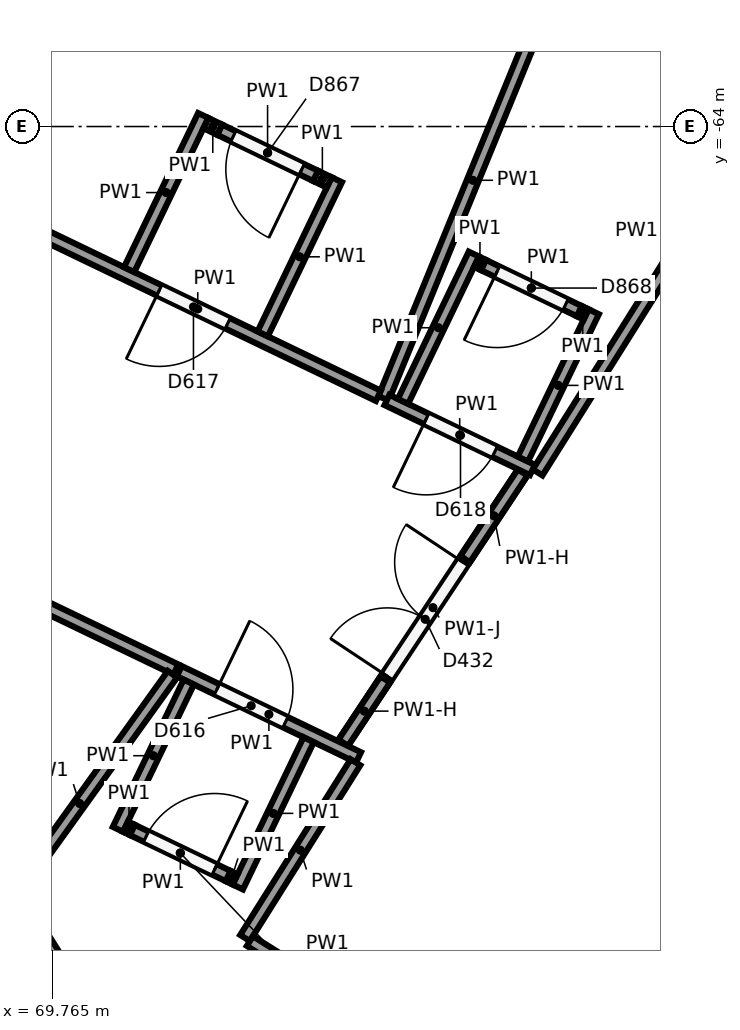
"""IFC4 building model, lengths in metres.
Left out: names, types, materials, properties, quantities, classifications, styles, units other than length and angle.
Written with IfcOpenShell. Run it as: python <this file> out.ifc"""

import sys

from ifc_helpers import new_model, si_unit, direction, frame, frame_2d, origin, origin_2d, place, context, subcontext, project, spatial, rectangle, circle, extrude, element, fill, save


model = new_model("IFC4")
c1 = context("Model", 3, precision=1e-05, world=origin(), true_north=direction((0.0, 1.0)))
c2 = subcontext(c1, "Body", "Model", "MODEL_VIEW")
j1 = project(units=[si_unit("LENGTHUNIT", "METRE"), si_unit("PLANEANGLEUNIT", "RADIAN")], contexts=[c1])
p1 = place(None, origin())
s1 = spatial("IfcSite", under=j1, at=p1, CompositionType="ELEMENT")
p2 = place(p1, origin())
s2 = spatial("IfcBuilding", under=s1, at=p2, CompositionType="ELEMENT")
p3 = place(p2, origin())
s3 = spatial("IfcBuildingStorey", under=s2, at=p3, CompositionType="ELEMENT", Elevation=0.0)
p4 = place(p3, frame((78.198, -72.272, 0.0), z_axis=(0.0, 0.0, 1.0), x_axis=(1.0, 0.0, 0.0)))
e1 = element("IfcColumn", 1, at=p4, inside=s3, PredefinedType="COLUMN", context=c2, shape_type="SweptSolid", body=[
    extrude(circle(Radius=0.6, at=origin_2d()), origin(), (0.0, 0.0, 1.0), 6.5),
])
p5 = place(p3, frame((66.937, -69.001, 0.0), z_axis=(0.0, 0.0, 1.0), x_axis=(0.901185296762, -0.433434032928, 0.0)))
e2 = element("IfcWall", 2, at=p5, inside=s3, PredefinedType="PARTITIONING", context=c2, shape_type="SweptSolid", body=[
    extrude(rectangle(XDim=4.944, YDim=0.15, at=frame_2d((2.472, 0.0))), origin(), (0.0, 0.0, 1.0), 6.15),
])
p6 = place(p3, frame((71.348, -71.206, 0.0), z_axis=(0.0, 0.0, 1.0), x_axis=(-0.583304436704, -0.812253614409, 0.0)))
e3 = element("IfcWall", 3, at=p6, inside=s3, PredefinedType="PARTITIONING", context=c2, shape_type="SweptSolid", body=[
    extrude(rectangle(XDim=4.188, YDim=0.15, at=frame_2d((2.094, 0.0))), origin(), (0.0, 0.0, 1.0), 6.15),
])
p7 = place(p3, frame((72.021, -78.442, 0.0), z_axis=(0.0, 0.0, 1.0), x_axis=(-0.532042078101, 0.846717914733, 0.0)))
e4 = element("IfcWall", 4, at=p7, inside=s3, PredefinedType="PARTITIONING", context=c2, shape_type="SweptSolid", body=[
    extrude(rectangle(XDim=4.905, YDim=0.15, at=frame_2d((2.453, 0.0))), origin(), (0.0, 0.0, 1.0), 6.15),
])
p8 = place(p3, frame((71.437, -71.165, 0.0), z_axis=(0.0, 0.0, 1.0), x_axis=(0.901204092293, -0.433394951556, 0.0)))
e5 = element("IfcWall", 5, at=p8, inside=s3, PredefinedType="PARTITIONING", context=c2, shape_type="SweptSolid", body=[
    extrude(rectangle(XDim=2.618, YDim=0.15, at=frame_2d((1.309, 0.0))), origin(), (0.0, 0.0, 1.0), 6.15),
])
p9 = place(p8, frame((0.55, 0.0, 0.0)))
e6 = element("IfcOpeningElement", 6, at=p9, cuts=e5, PredefinedType="OPENING", context=c2, shape_type="SweptSolid", body=[
    extrude(rectangle(XDim=1.0, YDim=2.1, at=frame_2d((0.5, 1.05))), frame((0.0, 0.085, 0.0), z_axis=(0.0, -1.0, 0.0), x_axis=(1.0, 0.0, 0.0)), (0.0, 0.0, 1.0), 0.17),
])
p10 = place(p3, frame((73.756, -72.364, 0.0), z_axis=(0.0, 0.0, 1.0), x_axis=(-0.532054374811, -0.846710187871, 0.0)))
e7 = element("IfcWall", 7, at=p10, inside=s3, PredefinedType="PARTITIONING", context=c2, shape_type="SweptSolid", body=[
    extrude(rectangle(XDim=2.731, YDim=0.15, at=frame_2d((1.366, 0.0))), origin(), (0.0, 0.0, 1.0), 6.15),
])
p11 = place(p3, frame((72.366, -74.716, 0.0), z_axis=(0.0, 0.0, 1.0), x_axis=(0.846749951858, -0.531991089237, 0.0)))
e8 = element("IfcWall", 8, at=p11, inside=s3, PredefinedType="PARTITIONING", context=c2, shape_type="SweptSolid", body=[
    extrude(rectangle(XDim=2.411, YDim=0.15, at=frame_2d((1.205, 0.0))), origin(), (0.0, 0.0, 1.0), 6.15),
])
p12 = place(p3, frame((76.476, -61.839, 0.0), z_axis=(0.0, 0.0, 1.0), x_axis=(-0.3791112098, -0.92535111747, 0.0)))
e9 = element("IfcWall", 9, at=p12, inside=s3, PredefinedType="PARTITIONING", context=c2, shape_type="SweptSolid", body=[
    extrude(rectangle(XDim=6.2, YDim=0.15, at=frame_2d((3.1, 0.0))), origin(), (0.0, 0.0, 1.0), 6.15),
])
p13 = place(p3, frame((74.058, -67.543, 0.0), z_axis=(0.0, 0.0, 1.0), x_axis=(-0.90118985402, 0.433424557462, 0.0)))
e10 = element("IfcWall", 10, at=p13, inside=s3, PredefinedType="PARTITIONING", context=c2, shape_type="SweptSolid", body=[
    extrude(rectangle(XDim=5.275, YDim=0.15, at=frame_2d((2.638, 0.0))), origin(), (0.0, 0.0, 1.0), 6.15),
])
p14 = place(p13, frame((2.2, 0.0, 0.0)))
e11 = element("IfcOpeningElement", 11, at=p14, cuts=e10, PredefinedType="OPENING", context=c2, shape_type="SweptSolid", body=[
    extrude(rectangle(XDim=1.0, YDim=2.1, at=frame_2d((0.5, 1.05))), frame((0.0, 0.085, 0.0), z_axis=(0.0, -1.0, 0.0), x_axis=(1.0, 0.0, 0.0)), (0.0, 0.0, 1.0), 0.17),
])
p15 = place(p3, frame((79.605, -63.055, 0.0), z_axis=(0.0, 0.0, 1.0), x_axis=(-0.532032873767, -0.846723698281, 0.0)))
e12 = element("IfcWall", 12, at=p15, inside=s3, PredefinedType="PARTITIONING", context=c2, shape_type="SweptSolid", body=[
    extrude(rectangle(XDim=6.49, YDim=0.15, at=frame_2d((3.245, 0.0))), origin(), (0.0, 0.0, 1.0), 6.15),
])
p16 = place(p3, frame((76.084, -68.518, 0.0), z_axis=(0.0, 0.0, 1.0), x_axis=(-0.901196299468, 0.433411155631, 0.0)))
e13 = element("IfcWall", 13, at=p16, inside=s3, PredefinedType="PARTITIONING", context=c2, shape_type="SweptSolid", body=[
    extrude(rectangle(XDim=2.124, YDim=0.15, at=frame_2d((1.062, 0.0))), origin(), (0.0, 0.0, 1.0), 6.15),
])
p17 = place(p16, frame((0.55, 0.0, 0.0)))
e14 = element("IfcOpeningElement", 14, at=p17, cuts=e13, PredefinedType="OPENING", context=c2, shape_type="SweptSolid", body=[
    extrude(rectangle(XDim=1.0, YDim=2.1, at=frame_2d((0.5, 1.05))), frame((0.0, 0.085, 0.0), z_axis=(0.0, -1.0, 0.0), x_axis=(1.0, 0.0, 0.0)), (0.0, 0.0, 1.0), 0.17),
])
for number, where, z_axis, x_axis in (
    (15, (71.562, -71.309, 0.0), (0.0, 0.0, 1.0), (-0.433, -0.901, 0.0)),
    (16, (73.14, -72.067, 0.0), (0.0, 0.0, 1.0), (-0.433, -0.901, 0.0)),
):
    element("IfcWall", number, at=place(p3, frame(where, z_axis=z_axis, x_axis=x_axis)), inside=s3, PredefinedType="PARTITIONING", context=c2, shape_type="SweptSolid", body=[
        extrude(rectangle(XDim=2.15, YDim=0.15, at=frame_2d((1.075, 0.0))), origin(), (0.0, 0.0, 1.0), 6.15),
    ])
p18 = place(p3, frame((70.731, -73.211, 0.0), z_axis=(0.0, 0.0, 1.0), x_axis=(0.900683407008, -0.434476006633, 0.0)))
e17 = element("IfcWall", 17, at=p18, inside=s3, PredefinedType="PARTITIONING", context=c2, shape_type="SweptSolid", body=[
    extrude(rectangle(XDim=0.1, YDim=0.15, at=frame_2d((0.05, 0.0))), origin(), (0.0, 0.0, 1.0), 6.15),
])
p19 = place(p3, frame((70.821, -73.255, 0.0), z_axis=(0.0, 0.0, 1.0), x_axis=(0.901226230947, -0.433348913294, 0.0)))
e18 = element("IfcWall", 18, at=p19, inside=s3, PredefinedType="PARTITIONING", context=c2, shape_type="SweptSolid", body=[
    extrude(rectangle(XDim=1.4, YDim=0.15, at=frame_2d((0.7, 0.0))), origin(), (0.0, 0.0, 1.0), 6.15),
])
p20 = place(p19, frame((0.2, 0.0, 0.0)))
e19 = element("IfcOpeningElement", 19, at=p20, cuts=e18, PredefinedType="OPENING", context=c2, shape_type="SweptSolid", body=[
    extrude(rectangle(XDim=1.0, YDim=2.1, at=frame_2d((0.5, 1.05))), frame((0.0, 0.085, 0.0), z_axis=(0.0, -1.0, 0.0), x_axis=(1.0, 0.0, 0.0)), (0.0, 0.0, 1.0), 0.17),
])
p21 = place(p3, frame((72.083, -73.861, 0.0), z_axis=(0.0, 0.0, 1.0), x_axis=(0.900683407008, -0.434476006633, 0.0)))
e20 = element("IfcWall", 20, at=p21, inside=s3, PredefinedType="PARTITIONING", context=c2, shape_type="SweptSolid", body=[
    extrude(rectangle(XDim=0.1, YDim=0.15, at=frame_2d((0.05, 0.0))), origin(), (0.0, 0.0, 1.0), 6.15),
])
p22 = place(p3, frame((72.535, -66.728, 0.0), z_axis=(0.0, 0.0, 1.0), x_axis=(0.433401217297, 0.901201079031, 0.0)))
e21 = element("IfcWall", 21, at=p22, inside=s3, PredefinedType="PARTITIONING", context=c2, shape_type="SweptSolid", body=[
    extrude(rectangle(XDim=2.25, YDim=0.15, at=frame_2d((1.125, 0.0))), origin(), (0.0, 0.0, 1.0), 6.15),
])
p23 = place(p3, frame((70.778, -65.883, 0.0), z_axis=(0.0, 0.0, 1.0), x_axis=(0.433446957245, 0.901179080569, 0.0)))
e22 = element("IfcWall", 22, at=p23, inside=s3, PredefinedType="PARTITIONING", context=c2, shape_type="SweptSolid", body=[
    extrude(rectangle(XDim=2.25, YDim=0.15, at=frame_2d((1.125, 0.0))), origin(), (0.0, 0.0, 1.0), 6.15),
])
p24 = place(p3, frame((73.41, -64.735, 0.0), z_axis=(0.0, 0.0, 1.0), x_axis=(-0.901160703759, 0.433485162377, 0.0)))
e23 = element("IfcWall", 23, at=p24, inside=s3, PredefinedType="PARTITIONING", context=c2, shape_type="SweptSolid", body=[
    extrude(rectangle(XDim=0.2, YDim=0.15, at=frame_2d((0.1, 0.0))), origin(), (0.0, 0.0, 1.0), 6.15),
])
p25 = place(p3, frame((73.23, -64.649, 0.0), z_axis=(0.0, 0.0, 1.0), x_axis=(-0.901158119361, 0.433490534971, 0.0)))
e24 = element("IfcWall", 24, at=p25, inside=s3, PredefinedType="PARTITIONING", context=c2, shape_type="SweptSolid", body=[
    extrude(rectangle(XDim=1.4, YDim=0.15, at=frame_2d((0.7, 0.0))), origin(), (0.0, 0.0, 1.0), 6.15),
])
p26 = place(p25, frame((0.2, 0.0, 0.0)))
e25 = element("IfcOpeningElement", 25, at=p26, cuts=e24, PredefinedType="OPENING", context=c2, shape_type="SweptSolid", body=[
    extrude(rectangle(XDim=1.0, YDim=2.1, at=frame_2d((0.5, 1.05))), frame((0.0, 0.085, 0.0), z_axis=(0.0, -1.0, 0.0), x_axis=(1.0, 0.0, 0.0)), (0.0, 0.0, 1.0), 0.17),
])
p27 = place(p3, frame((71.969, -64.042, 0.0), z_axis=(0.0, 0.0, 1.0), x_axis=(-0.901160703759, 0.433485162377, 0.0)))
e26 = element("IfcWall", 26, at=p27, inside=s3, PredefinedType="PARTITIONING", context=c2, shape_type="SweptSolid", body=[
    extrude(rectangle(XDim=0.2, YDim=0.15, at=frame_2d((0.1, 0.0))), origin(), (0.0, 0.0, 1.0), 6.15),
])
for number, where, z_axis, x_axis in (
    (27, (75.959, -68.375, 0.0), (0.0, 0.0, 1.0), (0.433, 0.901, 0.0)),
    (28, (74.382, -67.616, 0.0), (0.0, 0.0, 1.0), (0.433, 0.901, 0.0)),
):
    element("IfcWall", number, at=place(p3, frame(where, z_axis=z_axis, x_axis=x_axis)), inside=s3, PredefinedType="PARTITIONING", context=c2, shape_type="SweptSolid", body=[
        extrude(rectangle(XDim=2.15, YDim=0.15, at=frame_2d((1.075, 0.0))), origin(), (0.0, 0.0, 1.0), 6.15),
    ])
p28 = place(p3, frame((76.791, -66.472, 0.0), z_axis=(0.0, 0.0, 1.0), x_axis=(-0.900683407008, 0.434476006633, 0.0)))
e29 = element("IfcWall", 29, at=p28, inside=s3, PredefinedType="PARTITIONING", context=c2, shape_type="SweptSolid", body=[
    extrude(rectangle(XDim=0.1, YDim=0.15, at=frame_2d((0.05, 0.0))), origin(), (0.0, 0.0, 1.0), 6.15),
])
p29 = place(p3, frame((76.701, -66.428, 0.0), z_axis=(0.0, 0.0, 1.0), x_axis=(-0.901226230947, 0.433348913294, 0.0)))
e30 = element("IfcWall", 30, at=p29, inside=s3, PredefinedType="PARTITIONING", context=c2, shape_type="SweptSolid", body=[
    extrude(rectangle(XDim=1.4, YDim=0.15, at=frame_2d((0.7, 0.0))), origin(), (0.0, 0.0, 1.0), 6.15),
])
p30 = place(p29, frame((0.2, 0.0, 0.0)))
e31 = element("IfcOpeningElement", 31, at=p30, cuts=e30, PredefinedType="OPENING", context=c2, shape_type="SweptSolid", body=[
    extrude(rectangle(XDim=1.0, YDim=2.1, at=frame_2d((0.5, 1.05))), frame((0.0, 0.085, 0.0), z_axis=(0.0, -1.0, 0.0), x_axis=(1.0, 0.0, 0.0)), (0.0, 0.0, 1.0), 0.17),
])
p31 = place(p3, frame((75.439, -65.822, 0.0), z_axis=(0.0, 0.0, 1.0), x_axis=(-0.900683407008, 0.434476006633, 0.0)))
e32 = element("IfcWall", 32, at=p31, inside=s3, PredefinedType="PARTITIONING", context=c2, shape_type="SweptSolid", body=[
    extrude(rectangle(XDim=0.1, YDim=0.15, at=frame_2d((0.05, 0.0))), origin(), (0.0, 0.0, 1.0), 6.15),
])
p32 = place(p3, frame((73.595, -72.108, 0.0), z_axis=(0.0, 0.0, 1.0), x_axis=(0.552890314707, 0.833254042837, 0.0)))
e33 = element("IfcWall", 33, at=p32, inside=s3, PredefinedType="PARTITIONING", context=c2, shape_type="SweptSolid", body=[
    extrude(rectangle(XDim=4.268, YDim=0.15, at=frame_2d((2.134, 0.0))), origin(), (0.0, 0.0, 1.0), 5.05),
])
p33 = place(p32, frame((1.05, 0.0, 0.0)))
e34 = element("IfcOpeningElement", 34, at=p33, cuts=e33, PredefinedType="OPENING", context=c2, shape_type="SweptSolid", body=[
    extrude(rectangle(XDim=1.8, YDim=2.1, at=frame_2d((0.9, 1.05))), frame((0.0, 0.085, 0.0), z_axis=(0.0, -1.0, 0.0), x_axis=(1.0, 0.0, 0.0)), (0.0, 0.0, 1.0), 0.17),
])
p34 = place(p3, frame((73.595, -72.108, 5.05), z_axis=(0.0, 0.0, 1.0), x_axis=(0.552782992552, 0.833325244514, 0.0)))
e35 = element("IfcWall", 35, at=p34, inside=s3, PredefinedType="PARTITIONING", context=c2, shape_type="SweptSolid", body=[
    extrude(rectangle(XDim=1.0, YDim=0.15, at=frame_2d((0.5, 0.0))), origin(), (0.0, 0.0, 1.0), 1.1),
])
p35 = place(p3, frame((75.199, -69.691, 5.05), z_axis=(0.0, 0.0, 1.0), x_axis=(0.552845063211, 0.833284066861, 0.0)))
e36 = element("IfcWall", 36, at=p35, inside=s3, PredefinedType="PARTITIONING", context=c2, shape_type="SweptSolid", body=[
    extrude(rectangle(XDim=1.368, YDim=0.15, at=frame_2d((0.684, 0.0))), origin(), (0.0, 0.0, 1.0), 1.1),
])
p36 = place(p9, origin())
e37 = element("IfcDoor", 37, at=p36, inside=s3, OperationType="SINGLE_SWING_LEFT", PredefinedType="DOOR", context=c2, shape_type="SweptSolid", body=[
    extrude(rectangle(XDim=1.0, YDim=2.1, at=frame_2d((0.5, 1.05))), frame((0.0, 0.025, 0.0), z_axis=(0.0, -1.0, 0.0), x_axis=(1.0, 0.0, 0.0)), (0.0, 0.0, 1.0), 0.05),
])
fill(e6, e37)
p37 = place(p14, origin())
e38 = element("IfcDoor", 38, at=p37, inside=s3, OperationType="SINGLE_SWING_RIGHT", PredefinedType="DOOR", context=c2, shape_type="SweptSolid", body=[
    extrude(rectangle(XDim=1.0, YDim=2.1, at=frame_2d((0.5, 1.05))), frame((0.0, 0.025, 0.0), z_axis=(0.0, -1.0, 0.0), x_axis=(1.0, 0.0, 0.0)), (0.0, 0.0, 1.0), 0.05),
])
fill(e11, e38)
p38 = place(p17, origin())
e39 = element("IfcDoor", 39, at=p38, inside=s3, OperationType="SINGLE_SWING_RIGHT", PredefinedType="DOOR", context=c2, shape_type="SweptSolid", body=[
    extrude(rectangle(XDim=1.0, YDim=2.1, at=frame_2d((0.5, 1.05))), frame((0.0, 0.025, 0.0), z_axis=(0.0, -1.0, 0.0), x_axis=(1.0, 0.0, 0.0)), (0.0, 0.0, 1.0), 0.05),
])
fill(e14, e39)
p39 = place(p20, origin())
e40 = element("IfcDoor", 40, at=p39, inside=s3, OperationType="SINGLE_SWING_RIGHT", PredefinedType="DOOR", context=c2, shape_type="SweptSolid", body=[
    extrude(rectangle(XDim=1.0, YDim=2.1, at=frame_2d((0.5, 1.05))), frame((0.0, 0.025, 0.0), z_axis=(0.0, -1.0, 0.0), x_axis=(1.0, 0.0, 0.0)), (0.0, 0.0, 1.0), 0.05),
])
fill(e19, e40)
p40 = place(p26, origin())
e41 = element("IfcDoor", 41, at=p40, inside=s3, OperationType="SINGLE_SWING_LEFT", PredefinedType="DOOR", context=c2, shape_type="SweptSolid", body=[
    extrude(rectangle(XDim=1.0, YDim=2.1, at=frame_2d((0.5, 1.05))), frame((0.0, 0.025, 0.0), z_axis=(0.0, -1.0, 0.0), x_axis=(1.0, 0.0, 0.0)), (0.0, 0.0, 1.0), 0.05),
])
fill(e25, e41)
p41 = place(p30, origin())
e42 = element("IfcDoor", 42, at=p41, inside=s3, OperationType="SINGLE_SWING_RIGHT", PredefinedType="DOOR", context=c2, shape_type="SweptSolid", body=[
    extrude(rectangle(XDim=1.0, YDim=2.1, at=frame_2d((0.5, 1.05))), frame((0.0, 0.025, 0.0), z_axis=(0.0, -1.0, 0.0), x_axis=(1.0, 0.0, 0.0)), (0.0, 0.0, 1.0), 0.05),
])
fill(e31, e42)
p42 = place(p33, origin())
e43 = element("IfcDoor", 43, at=p42, inside=s3, OperationType="DOUBLE_DOOR_SINGLE_SWING", PredefinedType="DOOR", context=c2, shape_type="SweptSolid", body=[
    extrude(rectangle(XDim=1.8, YDim=2.1, at=frame_2d((0.9, 1.05))), frame((0.0, 0.025, 0.0), z_axis=(0.0, -1.0, 0.0), x_axis=(1.0, 0.0, 0.0)), (0.0, 0.0, 1.0), 0.05),
])
fill(e34, e43)
save(model, sys.argv[1])
